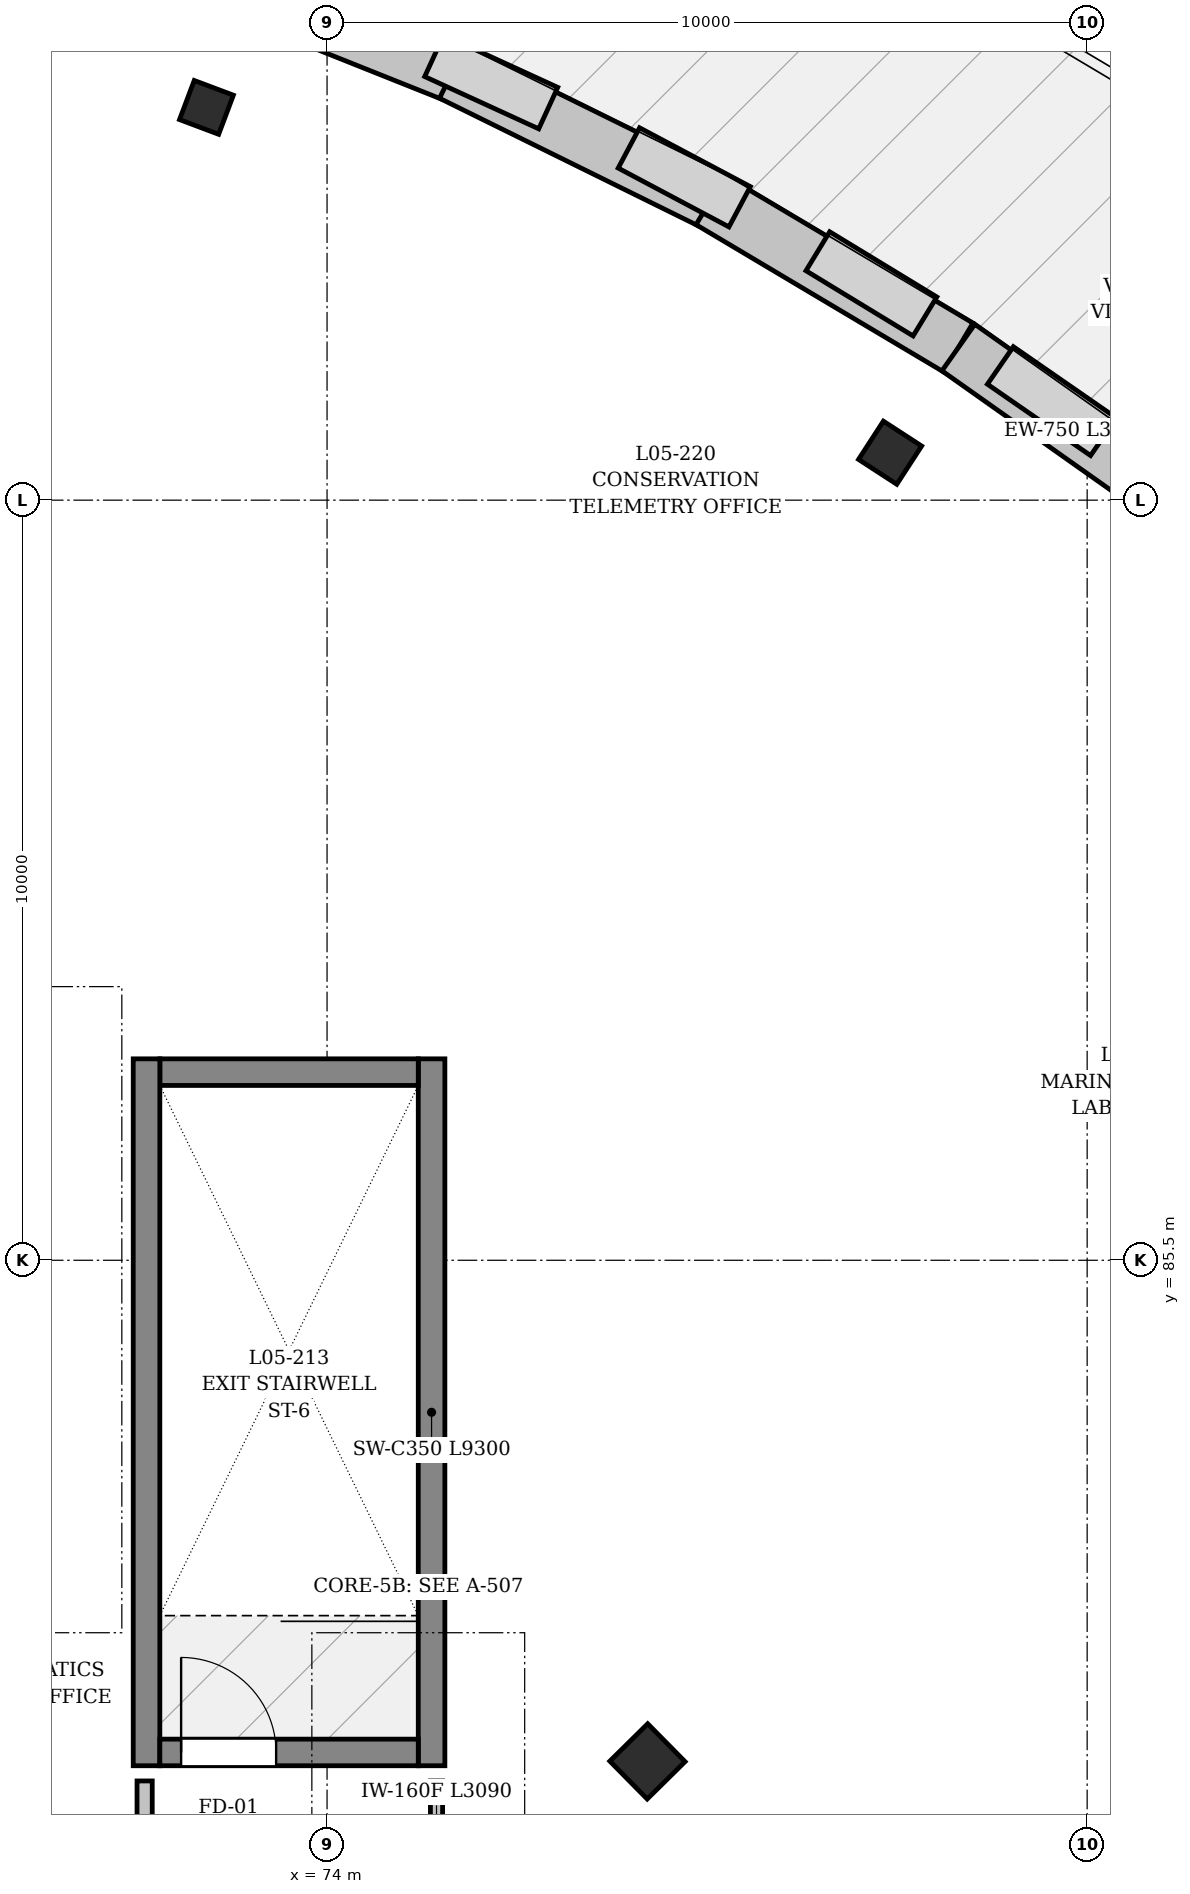
"""IFC4 building model, lengths in metres.
Left out: names, types, materials, properties, quantities, classifications, styles, units other than length and angle.
Written with IfcOpenShell. Run it as: python <this file> out.ifc"""

import sys

from ifc_helpers import new_model, si_unit, direction, frame, frame_2d, origin, origin_2d, place, context, subcontext, project, spatial, rectangle, extrude, element, fill, save


model = new_model("IFC4")
c1 = context("Model", 3, precision=1e-05, world=origin(), true_north=direction((0.0, 1.0)))
c2 = subcontext(c1, "Body", "Model", "MODEL_VIEW")
j1 = project(units=[si_unit("LENGTHUNIT", "METRE"), si_unit("PLANEANGLEUNIT", "RADIAN")], contexts=[c1])
p1 = place(None, origin())
s1 = spatial("IfcSite", under=j1, at=p1, CompositionType="ELEMENT")
p2 = place(p1, origin())
s2 = spatial("IfcBuilding", under=s1, at=p2, CompositionType="ELEMENT")
p3 = place(p2, frame((0.0, 0.0, 19.8)))
s3 = spatial("IfcBuildingStorey", under=s2, at=p3, CompositionType="ELEMENT", Elevation=19.8)
p4 = place(p3, frame((78.215, 78.907, 0.0), z_axis=(0.0, 0.0, 1.0), x_axis=(0.712026045991, 0.702153052995, 0.0)))
e1 = element("IfcColumn", 1, at=p4, inside=s3, PredefinedType="COLUMN", context=c2, shape_type="SweptSolid", body=[
    extrude(rectangle(XDim=0.7, YDim=0.7, at=origin_2d()), origin(), (0.0, 0.0, 1.0), 4.58),
])
p5 = place(p3, frame((81.407, 96.124, 0.0), z_axis=(0.0, 0.0, 1.0), x_axis=(0.544639035015, 0.838670567945, 0.0)))
e2 = element("IfcColumn", 2, at=p5, inside=s3, PredefinedType="COLUMN", context=c2, shape_type="SweptSolid", body=[
    extrude(rectangle(XDim=0.6, YDim=0.6, at=origin_2d()), origin(), (0.0, 0.0, 1.0), 4.58),
])
p6 = place(p3, frame((72.413, 100.667, 0.0), z_axis=(0.0, 0.0, 1.0), x_axis=(0.351841648405, 0.936059535739, 0.0)))
e3 = element("IfcColumn", 3, at=p6, inside=s3, PredefinedType="COLUMN", context=c2, shape_type="SweptSolid", body=[
    extrude(rectangle(XDim=0.55, YDim=0.55, at=origin_2d()), origin(), (0.0, 0.0, 1.0), 4.58),
])
p7 = place(p3, frame((72.123, 102.529, 0.0), z_axis=(0.0, 0.0, 1.0), x_axis=(0.928813725565, -0.3705469784, 0.0)))
e4 = element("IfcWall", 4, at=p7, inside=s3, PredefinedType="SOLIDWALL", context=c2, shape_type="SweptSolid", body=[
    extrude(rectangle(XDim=3.792, YDim=0.75, at=frame_2d((1.896, 0.0))), origin(), (0.0, 0.0, 1.0), 4.785),
])
p8 = place(p3, frame((75.645, 101.124, 0.0), z_axis=(0.0, 0.0, 1.0), x_axis=(0.896885562372, -0.442262691178, 0.0)))
e5 = element("IfcWall", 5, at=p8, inside=s3, PredefinedType="SOLIDWALL", context=c2, shape_type="SweptSolid", body=[
    extrude(rectangle(XDim=3.792, YDim=0.75, at=frame_2d((1.896, 0.0))), origin(), (0.0, 0.0, 1.0), 6.237),
])
p9 = place(p3, frame((79.047, 99.447, 0.0), z_axis=(0.0, 0.0, 1.0), x_axis=(0.859418161219, -0.51127333606, 0.0)))
e6 = element("IfcWall", 6, at=p9, inside=s3, PredefinedType="SOLIDWALL", context=c2, shape_type="SweptSolid", body=[
    extrude(rectangle(XDim=3.792, YDim=0.75, at=frame_2d((1.896, 0.0))), origin(), (0.0, 0.0, 1.0), 4.735),
])
p10 = place(p3, frame((82.306, 97.508, 0.0), z_axis=(0.0, 0.0, 1.0), x_axis=(0.816628763341, -0.57716328962, 0.0)))
e7 = element("IfcWall", 7, at=p10, inside=s3, PredefinedType="SOLIDWALL", context=c2, shape_type="SweptSolid", body=[
    extrude(rectangle(XDim=3.793, YDim=0.75, at=frame_2d((1.896, 0.0))), origin(), (0.0, 0.0, 1.0), 4.735),
])
p11 = place(p3, frame((75.375, 78.85, 0.0), z_axis=(0.0, 0.0, 1.0), x_axis=(0.0, 1.0, 0.0)))
e8 = element("IfcWall", 8, at=p11, inside=s3, PredefinedType="SHEAR", context=c2, shape_type="SweptSolid", body=[
    extrude(rectangle(XDim=9.3, YDim=0.35, at=frame_2d((4.65, 0.0))), origin(), (0.0, 0.0, 1.0), 3.6),
])
p12 = place(p3, frame((75.2, 87.975, 0.0), z_axis=(0.0, 0.0, 1.0), x_axis=(-1.0, 0.0, 0.0)))
e9 = element("IfcWall", 9, at=p12, inside=s3, PredefinedType="SHEAR", context=c2, shape_type="SweptSolid", body=[
    extrude(rectangle(XDim=3.4, YDim=0.35, at=frame_2d((1.7, 0.0))), origin(), (0.0, 0.0, 1.0), 3.6),
])
p13 = place(p3, frame((71.625, 88.15, 0.0), z_axis=(0.0, 0.0, 1.0), x_axis=(0.0, -1.0, 0.0)))
e10 = element("IfcWall", 10, at=p13, inside=s3, PredefinedType="SHEAR", context=c2, shape_type="SweptSolid", body=[
    extrude(rectangle(XDim=9.3, YDim=0.35, at=frame_2d((4.65, 0.0))), origin(), (0.0, 0.0, 1.0), 3.6),
])
p14 = place(p3, frame((71.8, 79.025, 0.0), z_axis=(0.0, 0.0, 1.0), x_axis=(1.0, 0.0, 0.0)))
e11 = element("IfcWall", 11, at=p14, inside=s3, PredefinedType="SHEAR", context=c2, shape_type="SweptSolid", body=[
    extrude(rectangle(XDim=3.4, YDim=0.35, at=frame_2d((1.7, 0.0))), origin(), (0.0, 0.0, 1.0), 3.6),
])
p15 = place(p14, frame((0.28, 0.0, 0.0)))
e12 = element("IfcOpeningElement", 12, at=p15, cuts=e11, PredefinedType="OPENING", context=c2, shape_type="SweptSolid", body=[
    extrude(rectangle(XDim=1.25, YDim=2.2, at=frame_2d((0.625, 1.1))), frame((0.0, 0.185, 0.0), z_axis=(0.0, -1.0, 0.0), x_axis=(1.0, 0.0, 0.0)), (0.0, 0.0, 1.0), 0.37),
])
p16 = place(p3, frame((71.6, 78.65, 0.0), z_axis=(0.0, 0.0, 1.0), x_axis=(0.0, -1.0, 0.0)))
e13 = element("IfcWall", 13, at=p16, inside=s3, PredefinedType="PARTITIONING", context=c2, shape_type="SweptSolid", body=[
    extrude(rectangle(XDim=3.05, YDim=0.2, at=frame_2d((1.525, 0.0))), origin(), (0.0, 0.0, 1.0), 3.55),
])
p17 = place(p16, frame((0.9, 0.0, 0.0)))
e14 = element("IfcOpeningElement", 14, at=p17, cuts=e13, PredefinedType="OPENING", context=c2, shape_type="SweptSolid", body=[
    extrude(rectangle(XDim=1.25, YDim=2.2, at=frame_2d((0.625, 1.1))), frame((0.0, 0.11, 0.0), z_axis=(0.0, -1.0, 0.0), x_axis=(1.0, 0.0, 0.0)), (0.0, 0.0, 1.0), 0.22),
])
p18 = place(p3, frame((75.44, 78.65, 0.0), z_axis=(0.0, 0.0, 1.0), x_axis=(0.0, -1.0, 0.0)))
e15 = element("IfcWall", 15, at=p18, inside=s3, PredefinedType="PARTITIONING", context=c2, shape_type="SweptSolid", body=[
    extrude(rectangle(XDim=3.09, YDim=0.16, at=frame_2d((1.545, 0.0))), origin(), (0.0, 0.0, 1.0), 3.55),
])
p19 = place(p18, frame((0.995, 0.0, 0.0)))
e16 = element("IfcOpeningElement", 16, at=p19, cuts=e15, PredefinedType="OPENING", context=c2, shape_type="SweptSolid", body=[
    extrude(rectangle(XDim=1.1, YDim=2.2, at=frame_2d((0.55, 1.1))), frame((0.0, 0.09, 0.0), z_axis=(0.0, -1.0, 0.0), x_axis=(1.0, 0.0, 0.0)), (0.0, 0.0, 1.0), 0.18),
])
p20 = place(p15, origin())
e17 = element("IfcDoor", 17, at=p20, inside=s3, OperationType="SINGLE_SWING_RIGHT", PredefinedType="DOOR", context=c2, shape_type="SweptSolid", body=[
    extrude(rectangle(XDim=1.25, YDim=2.2, at=frame_2d((0.625, 1.1))), frame((0.0, 0.025, 0.0), z_axis=(0.0, -1.0, 0.0), x_axis=(1.0, 0.0, 0.0)), (0.0, 0.0, 1.0), 0.05),
])
fill(e12, e17)
save(model, sys.argv[1])
